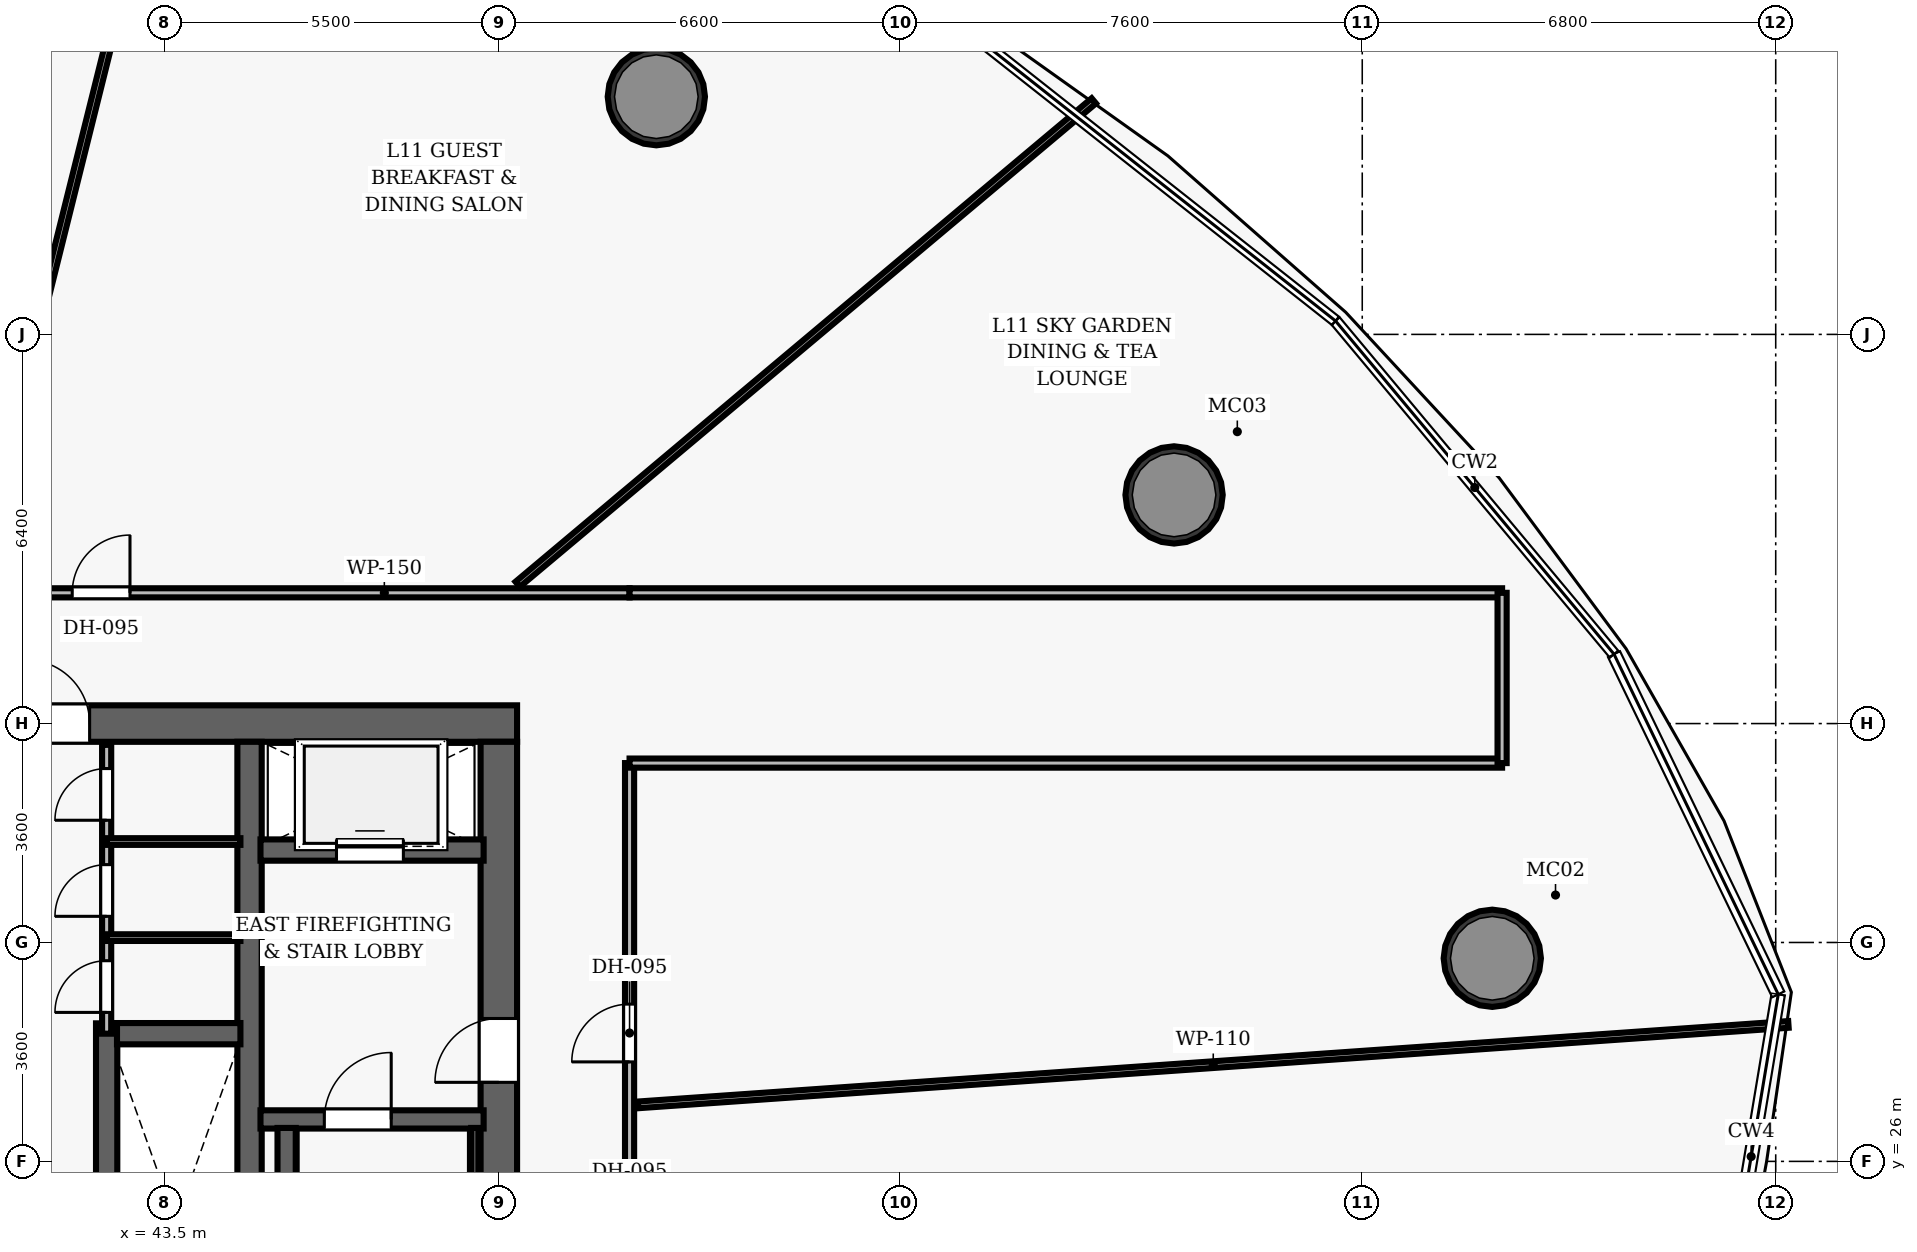
"""IFC4 building model, lengths in metres.
Left out: names, types, materials, properties, quantities, classifications, styles, units other than length and angle.
Written with IfcOpenShell. Run it as: python <this file> out.ifc"""

import sys

from ifc_helpers import new_model, si_unit, direction, frame, frame_2d, origin, origin_2d, place, context, subcontext, project, spatial, rectangle, hollow_circle, extrude, element, fill, save


model = new_model("IFC4")
c1 = context("Model", 3, precision=1e-05, world=origin(), true_north=direction((0.0, 1.0)))
c2 = subcontext(c1, "Body", "Model", "MODEL_VIEW")
j1 = project(units=[si_unit("LENGTHUNIT", "METRE"), si_unit("PLANEANGLEUNIT", "RADIAN")], contexts=[c1])
p1 = place(None, origin())
s1 = spatial("IfcSite", under=j1, at=p1, CompositionType="ELEMENT")
p2 = place(p1, origin())
s2 = spatial("IfcBuilding", under=s1, at=p2, CompositionType="ELEMENT")
p3 = place(p2, frame((0.0, 0.0, 55.4)))
s3 = spatial("IfcBuildingStorey", under=s2, at=p3, CompositionType="ELEMENT", Elevation=55.4)
p4 = place(p3, frame((26.7, 33.2, 0.0), z_axis=(0.0, 0.0, 1.0), x_axis=(1.0, 0.0, 0.0)))
e1 = element("IfcWall", 1, at=p4, inside=s3, PredefinedType="SHEAR", context=c2, shape_type="SweptSolid", body=[
    extrude(rectangle(XDim=22.6, YDim=0.6, at=frame_2d((11.3, 0.0))), origin(), (0.0, 0.0, 1.0), 3.5),
])
p5 = place(p4, frame((4.62, 0.0, 0.0)))
e2 = element("IfcOpeningElement", 2, at=p5, cuts=e1, PredefinedType="OPENING", context=c2, shape_type="SweptSolid", body=[
    extrude(rectangle(XDim=1.05, YDim=2.15, at=frame_2d((0.525, 1.075))), frame((0.0, 0.31, 0.0), z_axis=(0.0, -1.0, 0.0), x_axis=(1.0, 0.0, 0.0)), (0.0, 0.0, 1.0), 0.62),
])
p6 = place(p4, frame((14.52, 0.0, 0.0)))
e3 = element("IfcOpeningElement", 3, at=p6, cuts=e1, PredefinedType="OPENING", context=c2, shape_type="SweptSolid", body=[
    extrude(rectangle(XDim=1.05, YDim=2.15, at=frame_2d((0.525, 1.075))), frame((0.0, 0.31, 0.0), z_axis=(0.0, -1.0, 0.0), x_axis=(1.0, 0.0, 0.0)), (0.0, 0.0, 1.0), 0.62),
])
p7 = place(p3, frame((49.0, 19.1, 0.0), z_axis=(0.0, 0.0, 1.0), x_axis=(0.0, 1.0, 0.0)))
e4 = element("IfcWall", 4, at=p7, inside=s3, PredefinedType="SHEAR", context=c2, shape_type="SweptSolid", body=[
    extrude(rectangle(XDim=13.8, YDim=0.6, at=frame_2d((6.9, 0.0))), origin(), (0.0, 0.0, 1.0), 3.5),
])
p8 = place(p7, frame((8.2, 0.0, 0.0)))
e5 = element("IfcOpeningElement", 5, at=p8, cuts=e4, PredefinedType="OPENING", context=c2, shape_type="SweptSolid", body=[
    extrude(rectangle(XDim=1.05, YDim=2.15, at=frame_2d((0.525, 1.075))), frame((0.0, 0.31, 0.0), z_axis=(0.0, -1.0, 0.0), x_axis=(1.0, 0.0, 0.0)), (0.0, 0.0, 1.0), 0.62),
])
p9 = place(p3, frame((44.9, 19.1, 0.0), z_axis=(0.0, 0.0, 1.0), x_axis=(0.0, 1.0, 0.0)))
e6 = element("IfcWall", 6, at=p9, inside=s3, PredefinedType="SHEAR", context=c2, shape_type="SweptSolid", body=[
    extrude(rectangle(XDim=13.8, YDim=0.4, at=frame_2d((6.9, 0.0))), origin(), (0.0, 0.0, 1.0), 3.5),
])
for number, where, z_axis, x_axis in (
    (7, (65.339, 29.34, 0.0), (0.0, 0.0, 1.0), (1.0, 0.0, 0.0)),
    (8, (60.105, 36.96, 0.0), (0.0, 0.0, 1.0), (1.0, 0.0, 0.0)),
    (9, (51.59, 43.509, 0.0), (0.0, 0.0, 1.0), (1.0, 0.0, 0.0)),
):
    element("IfcColumn", number, at=place(p3, frame(where, z_axis=z_axis, x_axis=x_axis)), inside=s3, PredefinedType="COLUMN", context=c2, shape_type="SweptSolid", body=[
        extrude(hollow_circle(Radius=0.8, WallThickness=0.06, at=origin_2d()), origin(), (0.0, 0.0, 1.0), 3.5),
    ])
p10 = place(p3, frame((45.08, 26.69, 0.0), z_axis=(0.0, 0.0, 1.0), x_axis=(1.0, 0.0, 0.0)))
e10 = element("IfcWall", 10, at=p10, inside=s3, PredefinedType="SHEAR", context=c2, shape_type="SweptSolid", body=[
    extrude(rectangle(XDim=3.67, YDim=0.3, at=frame_2d((1.835, 0.0))), origin(), (0.0, 0.0, 1.0), 3.5),
])
p11 = place(p10, frame((1.05, 0.0, 0.0)))
e11 = element("IfcOpeningElement", 11, at=p11, cuts=e10, PredefinedType="OPENING", context=c2, shape_type="SweptSolid", body=[
    extrude(rectangle(XDim=1.1, YDim=2.15, at=frame_2d((0.55, 1.075))), frame((0.0, 0.16, 0.0), z_axis=(0.0, -1.0, 0.0), x_axis=(1.0, 0.0, 0.0)), (0.0, 0.0, 1.0), 0.32),
])
p12 = place(p3, frame((45.51, 19.05, 0.0), z_axis=(0.0, 0.0, 1.0), x_axis=(0.0, 1.0, 0.0)))
e12 = element("IfcWall", 12, at=p12, inside=s3, PredefinedType="SHEAR", context=c2, shape_type="SweptSolid", body=[
    extrude(rectangle(XDim=7.5, YDim=0.3, at=frame_2d((3.75, 0.0))), origin(), (0.0, 0.0, 1.0), 3.5),
])
p13 = place(p3, frame((48.605, 19.1, 0.0), z_axis=(0.0, 0.0, 1.0), x_axis=(0.0, 1.0, 0.0)))
e13 = element("IfcWall", 13, at=p13, inside=s3, PredefinedType="SHEAR", context=c2, shape_type="SweptSolid", body=[
    extrude(rectangle(XDim=7.45, YDim=0.12, at=frame_2d((3.725, 0.0))), origin(), (0.0, 0.0, 1.0), 3.5),
])
p14 = place(p3, frame((45.08, 31.12, 0.0), z_axis=(0.0, 0.0, 1.0), x_axis=(1.0, 0.0, 0.0)))
e14 = element("IfcWall", 14, at=p14, inside=s3, PredefinedType="SHEAR", context=c2, shape_type="SweptSolid", body=[
    extrude(rectangle(XDim=3.67, YDim=0.35, at=frame_2d((1.835, 0.0))), origin(), (0.0, 0.0, 1.0), 2.6),
])
p15 = place(p14, frame((1.25, 0.0, 0.0)))
e15 = element("IfcOpeningElement", 15, at=p15, cuts=e14, PredefinedType="OPENING", context=c2, shape_type="SweptSolid", body=[
    extrude(rectangle(XDim=1.1, YDim=2.15, at=frame_2d((0.55, 1.075))), frame((0.0, 0.185, 0.0), z_axis=(0.0, -1.0, 0.0), x_axis=(1.0, 0.0, 0.0)), (0.0, 0.0, 1.0), 0.37),
])
p16 = place(p3, frame((42.55, 21.73, 0.0), z_axis=(0.0, 0.0, 1.0), x_axis=(0.0, 1.0, 0.0)))
e16 = element("IfcWall", 16, at=p16, inside=s3, PredefinedType="SHEAR", context=c2, shape_type="SweptSolid", body=[
    extrude(rectangle(XDim=6.54, YDim=0.35, at=frame_2d((3.27, 0.0))), origin(), (0.0, 0.0, 1.0), 2.6),
])
p17 = place(p3, frame((42.72, 28.1, 0.0), z_axis=(0.0, 0.0, 1.0), x_axis=(1.0, 0.0, 0.0)))
e17 = element("IfcWall", 17, at=p17, inside=s3, PredefinedType="SHEAR", context=c2, shape_type="SweptSolid", body=[
    extrude(rectangle(XDim=2.03, YDim=0.35, at=frame_2d((1.015, 0.0))), origin(), (0.0, 0.0, 1.0), 2.6),
])
p18 = place(p3, frame((42.55, 28.1, 0.0), z_axis=(0.0, 0.0, 1.0), x_axis=(0.0, 1.0, 0.0)))
e18 = element("IfcWall", 18, at=p18, inside=s3, PredefinedType="PARTITIONING", context=c2, shape_type="SweptSolid", body=[
    extrude(rectangle(XDim=4.75, YDim=0.15, at=frame_2d((2.375, 0.0))), origin(), (0.0, 0.0, 1.0), 2.6),
])
p19 = place(p18, frame((0.35, 0.0, 0.0)))
e19 = element("IfcOpeningElement", 19, at=p19, cuts=e18, PredefinedType="OPENING", context=c2, shape_type="SweptSolid", body=[
    extrude(rectangle(XDim=0.85, YDim=2.1, at=frame_2d((0.425, 1.05))), frame((0.0, 0.085, 0.0), z_axis=(0.0, -1.0, 0.0), x_axis=(1.0, 0.0, 0.0)), (0.0, 0.0, 1.0), 0.17),
])
p20 = place(p18, frame((1.93, 0.0, 0.0)))
e20 = element("IfcOpeningElement", 20, at=p20, cuts=e18, PredefinedType="OPENING", context=c2, shape_type="SweptSolid", body=[
    extrude(rectangle(XDim=0.85, YDim=2.1, at=frame_2d((0.425, 1.05))), frame((0.0, 0.085, 0.0), z_axis=(0.0, -1.0, 0.0), x_axis=(1.0, 0.0, 0.0)), (0.0, 0.0, 1.0), 0.17),
])
p21 = place(p18, frame((3.51, 0.0, 0.0)))
e21 = element("IfcOpeningElement", 21, at=p21, cuts=e18, PredefinedType="OPENING", context=c2, shape_type="SweptSolid", body=[
    extrude(rectangle(XDim=0.85, YDim=2.1, at=frame_2d((0.425, 1.05))), frame((0.0, 0.085, 0.0), z_axis=(0.0, -1.0, 0.0), x_axis=(1.0, 0.0, 0.0)), (0.0, 0.0, 1.0), 0.17),
])
for number, where, z_axis, x_axis in (
    (22, (42.55, 29.68, 0.0), (0.0, 0.0, 1.0), (1.0, 0.0, 0.0)),
    (23, (42.55, 31.26, 0.0), (0.0, 0.0, 1.0), (1.0, 0.0, 0.0)),
):
    element("IfcWall", number, at=place(p3, frame(where, z_axis=z_axis, x_axis=x_axis)), inside=s3, PredefinedType="PARTITIONING", context=c2, shape_type="SweptSolid", body=[
        extrude(rectangle(XDim=2.2, YDim=0.11, at=frame_2d((1.1, 0.0))), origin(), (0.0, 0.0, 1.0), 2.6),
    ])
p22 = place(p3, frame((27.65, 35.35, 0.0), z_axis=(0.0, 0.0, 1.0), x_axis=(1.0, 0.0, 0.0)))
e24 = element("IfcWall", 24, at=p22, inside=s3, PredefinedType="PARTITIONING", context=c2, shape_type="SweptSolid", body=[
    extrude(rectangle(XDim=23.5, YDim=0.15, at=frame_2d((11.75, 0.0))), origin(), (0.0, 0.0, 1.0), 2.6),
])
p23 = place(p22, frame((14.334, 0.0, 0.0)))
e25 = element("IfcOpeningElement", 25, at=p23, cuts=e24, PredefinedType="OPENING", context=c2, shape_type="SweptSolid", body=[
    extrude(rectangle(XDim=0.95, YDim=2.15, at=frame_2d((0.475, 1.075))), frame((0.0, 0.085, 0.0), z_axis=(0.0, -1.0, 0.0), x_axis=(1.0, 0.0, 0.0)), (0.0, 0.0, 1.0), 0.17),
])
p24 = place(p22, frame((7.447, 0.0, 0.0)))
e26 = element("IfcOpeningElement", 26, at=p24, cuts=e24, PredefinedType="OPENING", context=c2, shape_type="SweptSolid", body=[
    extrude(rectangle(XDim=0.95, YDim=2.15, at=frame_2d((0.475, 1.075))), frame((0.0, 0.085, 0.0), z_axis=(0.0, -1.0, 0.0), x_axis=(1.0, 0.0, 0.0)), (0.0, 0.0, 1.0), 0.17),
])
p25 = place(p22, frame((4.64, 0.0, 0.0)))
e27 = element("IfcOpeningElement", 27, at=p25, cuts=e24, PredefinedType="OPENING", context=c2, shape_type="SweptSolid", body=[
    extrude(rectangle(XDim=0.95, YDim=2.15, at=frame_2d((0.475, 1.075))), frame((0.0, 0.085, 0.0), z_axis=(0.0, -1.0, 0.0), x_axis=(1.0, 0.0, 0.0)), (0.0, 0.0, 1.0), 0.17),
])
p26 = place(p3, frame((51.15, 16.65, 0.0), z_axis=(0.0, 0.0, 1.0), x_axis=(0.0, 1.0, 0.0)))
e28 = element("IfcWall", 28, at=p26, inside=s3, PredefinedType="PARTITIONING", context=c2, shape_type="SweptSolid", body=[
    extrude(rectangle(XDim=15.9, YDim=0.15, at=frame_2d((7.95, 0.0))), origin(), (0.0, 0.0, 1.0), 2.6),
])
p27 = place(p26, frame((10.986, 0.0, 0.0)))
e29 = element("IfcOpeningElement", 29, at=p27, cuts=e28, PredefinedType="OPENING", context=c2, shape_type="SweptSolid", body=[
    extrude(rectangle(XDim=0.95, YDim=2.15, at=frame_2d((0.475, 1.075))), frame((0.0, 0.085, 0.0), z_axis=(0.0, -1.0, 0.0), x_axis=(1.0, 0.0, 0.0)), (0.0, 0.0, 1.0), 0.17),
])
p28 = place(p26, frame((7.645, 0.0, 0.0)))
e30 = element("IfcOpeningElement", 30, at=p28, cuts=e28, PredefinedType="OPENING", context=c2, shape_type="SweptSolid", body=[
    extrude(rectangle(XDim=0.95, YDim=2.15, at=frame_2d((0.475, 1.075))), frame((0.0, 0.085, 0.0), z_axis=(0.0, -1.0, 0.0), x_axis=(1.0, 0.0, 0.0)), (0.0, 0.0, 1.0), 0.17),
])
for number, where, z_axis, x_axis in (
    (31, (51.15, 35.35, 0.0), (0.0, 0.0, 1.0), (1.0, 0.0, 0.0)),
    (32, (51.15, 32.55, 0.0), (0.0, 0.0, 1.0), (1.0, 0.0, 0.0)),
):
    element("IfcWall", number, at=place(p3, frame(where, z_axis=z_axis, x_axis=x_axis)), inside=s3, PredefinedType="PARTITIONING", context=c2, shape_type="SweptSolid", body=[
        extrude(rectangle(XDim=14.35, YDim=0.15, at=frame_2d((7.175, 0.0))), origin(), (0.0, 0.0, 1.0), 2.6),
    ])
p29 = place(p3, frame((65.5, 32.55, 0.0), z_axis=(0.0, 0.0, 1.0), x_axis=(0.0, 1.0, 0.0)))
e33 = element("IfcWall", 33, at=p29, inside=s3, PredefinedType="PARTITIONING", context=c2, shape_type="SweptSolid", body=[
    extrude(rectangle(XDim=2.8, YDim=0.15, at=frame_2d((1.4, 0.0))), origin(), (0.0, 0.0, 1.0), 2.6),
])
p30 = place(p3, frame((51.29, 26.929, 0.0), z_axis=(0.0, 0.0, 1.0), x_axis=(0.997563842889, 0.069759439227, 0.0)))
e34 = element("IfcWall", 34, at=p30, inside=s3, PredefinedType="PARTITIONING", context=c2, shape_type="SweptSolid", body=[
    extrude(rectangle(XDim=18.965, YDim=0.11, at=frame_2d((9.482, 0.0))), origin(), (0.0, 0.0, 1.0), 2.6),
])
p31 = place(p3, frame((49.31, 35.49, 0.0), z_axis=(0.0, 0.0, 1.0), x_axis=(0.766037598893, 0.64279576623, 0.0)))
e35 = element("IfcWall", 35, at=p31, inside=s3, PredefinedType="PARTITIONING", context=c2, shape_type="SweptSolid", body=[
    extrude(rectangle(XDim=12.369, YDim=0.11, at=frame_2d((6.185, 0.0))), origin(), (0.0, 0.0, 1.0), 2.6),
])
p32 = place(p3, frame((40.366, 35.49, 0.0), z_axis=(0.0, 0.0, 1.0), x_axis=(0.241922333807, 0.970295617019, 0.0)))
e36 = element("IfcWall", 36, at=p32, inside=s3, PredefinedType="PARTITIONING", context=c2, shape_type="SweptSolid", body=[
    extrude(rectangle(XDim=14.801, YDim=0.11, at=frame_2d((7.4, 0.0))), origin(), (0.0, 0.0, 1.0), 2.6),
])
p33 = place(p11, origin())
e37 = element("IfcDoor", 37, at=p33, inside=s3, OperationType="SINGLE_SWING_RIGHT", PredefinedType="DOOR", context=c2, shape_type="SweptSolid", body=[
    extrude(rectangle(XDim=1.1, YDim=2.15, at=frame_2d((0.55, 1.075))), frame((0.0, 0.025, 0.0), z_axis=(0.0, -1.0, 0.0), x_axis=(1.0, 0.0, 0.0)), (0.0, 0.0, 1.0), 0.05),
])
fill(e11, e37)
p34 = place(p8, origin())
e38 = element("IfcDoor", 38, at=p34, inside=s3, OperationType="SINGLE_SWING_LEFT", PredefinedType="DOOR", context=c2, shape_type="SweptSolid", body=[
    extrude(rectangle(XDim=1.05, YDim=2.15, at=frame_2d((0.525, 1.075))), frame((0.0, 0.025, 0.0), z_axis=(0.0, -1.0, 0.0), x_axis=(1.0, 0.0, 0.0)), (0.0, 0.0, 1.0), 0.05),
])
fill(e5, e38)
p35 = place(p6, origin())
e39 = element("IfcDoor", 39, at=p35, inside=s3, OperationType="SINGLE_SWING_LEFT", PredefinedType="DOOR", context=c2, shape_type="SweptSolid", body=[
    extrude(rectangle(XDim=1.05, YDim=2.15, at=frame_2d((0.525, 1.075))), frame((0.0, 0.025, 0.0), z_axis=(0.0, -1.0, 0.0), x_axis=(1.0, 0.0, 0.0)), (0.0, 0.0, 1.0), 0.05),
])
fill(e3, e39)
p36 = place(p19, origin())
e40 = element("IfcDoor", 40, at=p36, inside=s3, OperationType="SINGLE_SWING_LEFT", PredefinedType="DOOR", context=c2, shape_type="SweptSolid", body=[
    extrude(rectangle(XDim=0.85, YDim=2.1, at=frame_2d((0.425, 1.05))), frame((0.0, 0.025, 0.0), z_axis=(0.0, -1.0, 0.0), x_axis=(1.0, 0.0, 0.0)), (0.0, 0.0, 1.0), 0.05),
])
fill(e19, e40)
p37 = place(p20, origin())
e41 = element("IfcDoor", 41, at=p37, inside=s3, OperationType="SINGLE_SWING_LEFT", PredefinedType="DOOR", context=c2, shape_type="SweptSolid", body=[
    extrude(rectangle(XDim=0.85, YDim=2.1, at=frame_2d((0.425, 1.05))), frame((0.0, 0.025, 0.0), z_axis=(0.0, -1.0, 0.0), x_axis=(1.0, 0.0, 0.0)), (0.0, 0.0, 1.0), 0.05),
])
fill(e20, e41)
p38 = place(p21, origin())
e42 = element("IfcDoor", 42, at=p38, inside=s3, OperationType="SINGLE_SWING_LEFT", PredefinedType="DOOR", context=c2, shape_type="SweptSolid", body=[
    extrude(rectangle(XDim=0.85, YDim=2.1, at=frame_2d((0.425, 1.05))), frame((0.0, 0.025, 0.0), z_axis=(0.0, -1.0, 0.0), x_axis=(1.0, 0.0, 0.0)), (0.0, 0.0, 1.0), 0.05),
])
fill(e21, e42)
p39 = place(p27, origin())
e43 = element("IfcDoor", 43, at=p39, inside=s3, OperationType="SINGLE_SWING_LEFT", PredefinedType="DOOR", context=c2, shape_type="SweptSolid", body=[
    extrude(rectangle(XDim=0.95, YDim=2.15, at=frame_2d((0.475, 1.075))), frame((0.0, 0.025, 0.0), z_axis=(0.0, -1.0, 0.0), x_axis=(1.0, 0.0, 0.0)), (0.0, 0.0, 1.0), 0.05),
])
fill(e29, e43)
p40 = place(p23, origin())
e44 = element("IfcDoor", 44, at=p40, inside=s3, OperationType="SINGLE_SWING_RIGHT", PredefinedType="DOOR", context=c2, shape_type="SweptSolid", body=[
    extrude(rectangle(XDim=0.95, YDim=2.15, at=frame_2d((0.475, 1.075))), frame((0.0, 0.025, 0.0), z_axis=(0.0, -1.0, 0.0), x_axis=(1.0, 0.0, 0.0)), (0.0, 0.0, 1.0), 0.05),
])
fill(e25, e44)
p41 = place(p15, origin())
e45 = element("IfcDoor", 45, at=p41, inside=s3, OperationType="SLIDING_TO_LEFT", PredefinedType="DOOR", context=c2, shape_type="SweptSolid", body=[
    extrude(rectangle(XDim=1.1, YDim=2.15, at=frame_2d((0.55, 1.075))), frame((0.0, 0.025, 0.0), z_axis=(0.0, -1.0, 0.0), x_axis=(1.0, 0.0, 0.0)), (0.0, 0.0, 1.0), 0.05),
])
fill(e15, e45)
save(model, sys.argv[1])
